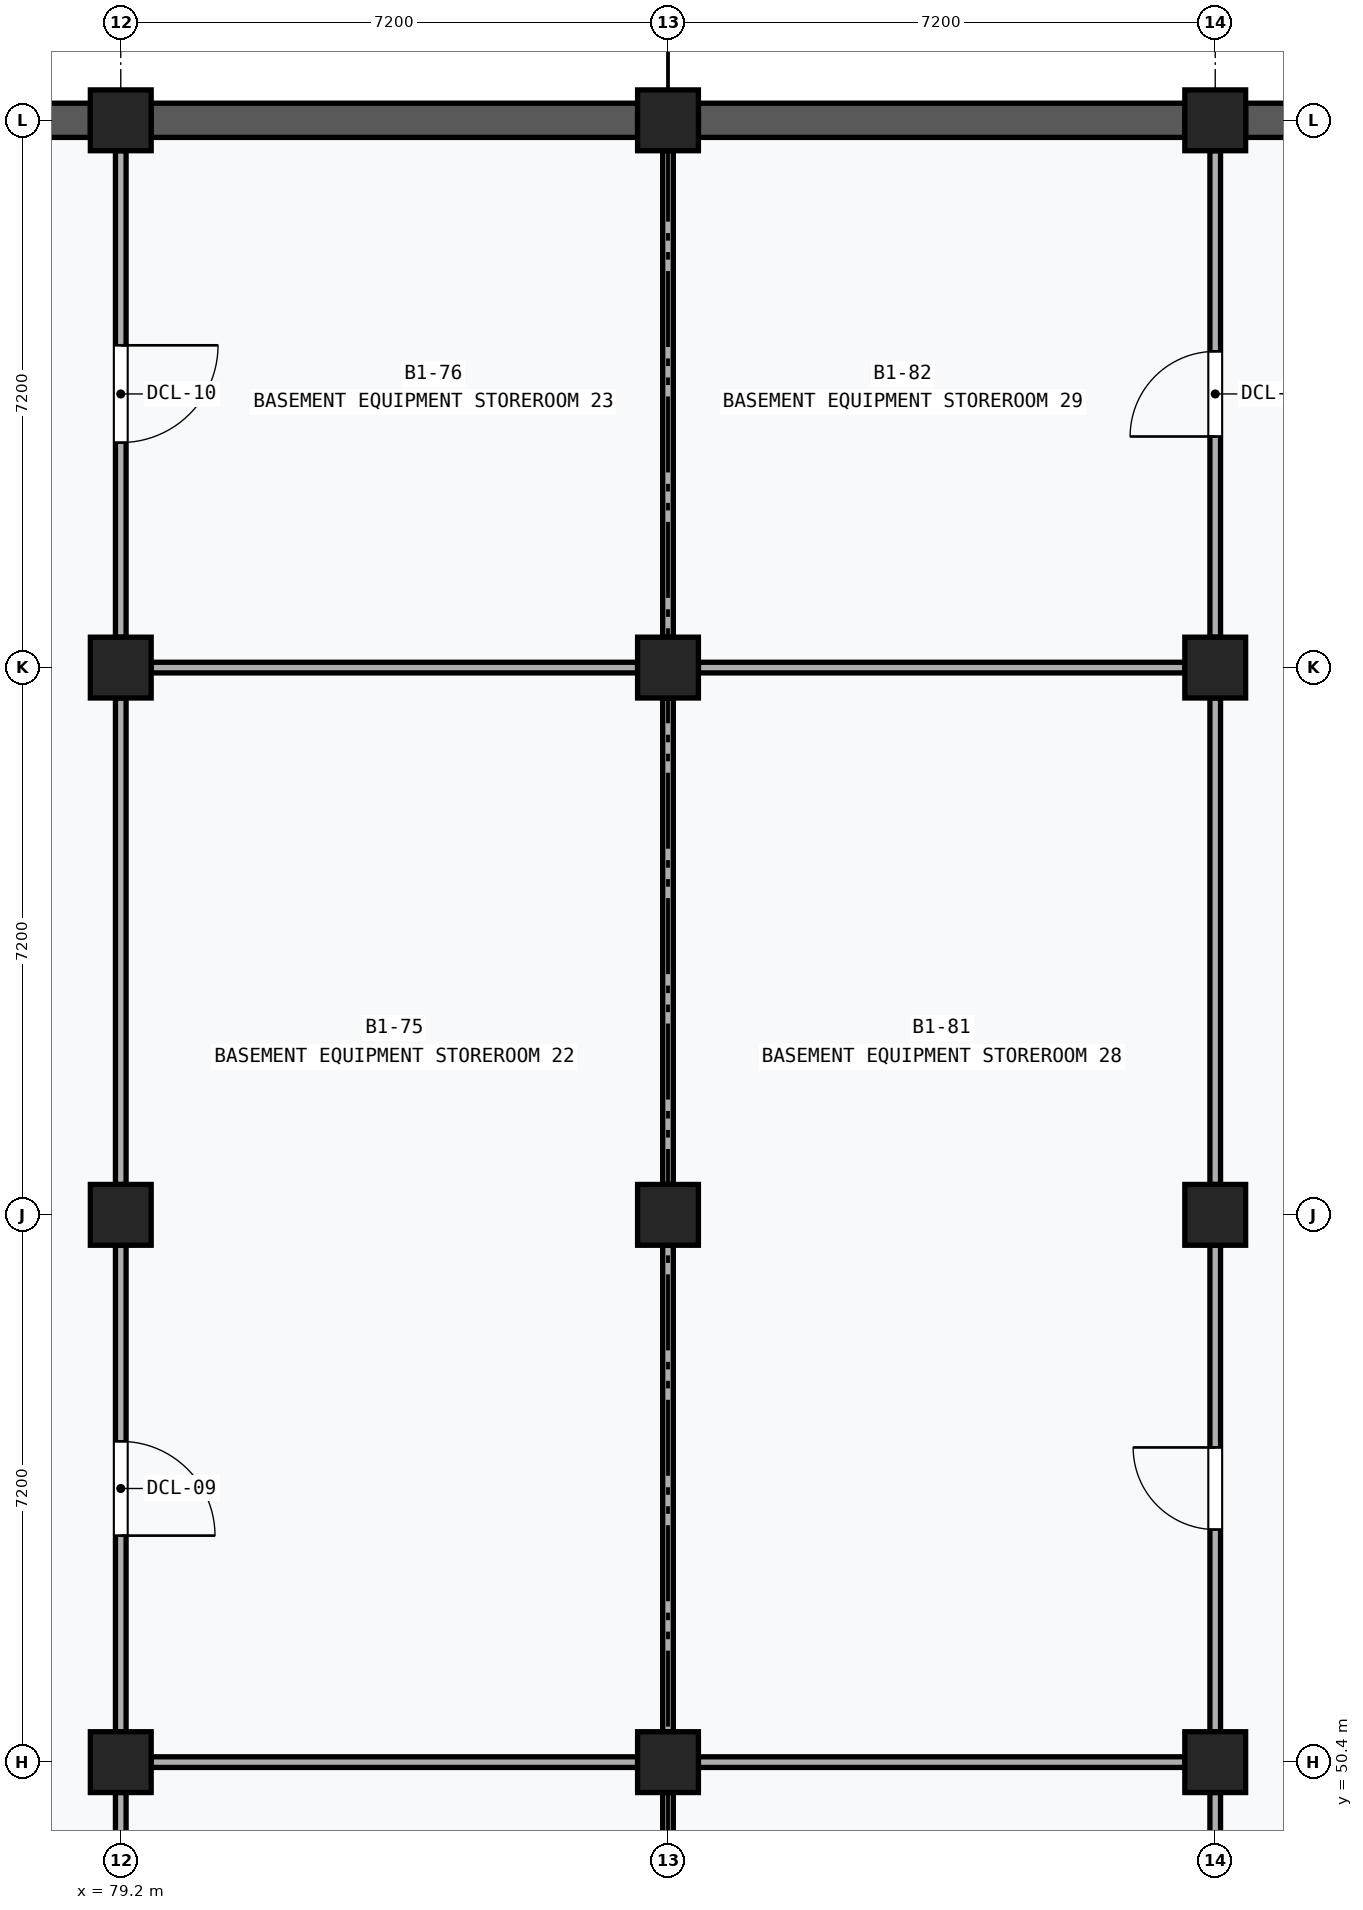
"""IFC4 building model, lengths in metres.
Left out: names, types, materials, properties, quantities, classifications, styles, units other than length and angle.
Written with IfcOpenShell. Run it as: python <this file> out.ifc"""

import sys

from ifc_helpers import new_model, si_unit, direction, frame, frame_2d, origin, origin_2d, place, context, subcontext, project, spatial, rectangle, extrude, element, fill, save


model = new_model("IFC4")
c1 = context("Model", 3, precision=1e-05, world=origin(), true_north=direction((0.0, 1.0)))
c2 = subcontext(c1, "Body", "Model", "MODEL_VIEW")
j1 = project(units=[si_unit("LENGTHUNIT", "METRE"), si_unit("PLANEANGLEUNIT", "RADIAN")], contexts=[c1])
p1 = place(None, origin())
s1 = spatial("IfcSite", under=j1, at=p1, CompositionType="ELEMENT")
p2 = place(p1, origin())
s2 = spatial("IfcBuilding", under=s1, at=p2, CompositionType="ELEMENT")
p3 = place(p2, frame((0.0, 0.0, -4.5)))
s3 = spatial("IfcBuildingStorey", under=s2, at=p3, CompositionType="ELEMENT", Elevation=-4.5)
for number, where, z_axis, x_axis in (
    (1, (79.2, 50.4, 0.0), (0.0, 0.0, 1.0), (1.0, 0.0, 0.0)),
    (2, (79.2, 57.6, 0.0), (0.0, 0.0, 1.0), (1.0, 0.0, 0.0)),
    (3, (79.2, 64.8, 0.0), (0.0, 0.0, 1.0), (1.0, 0.0, 0.0)),
    (4, (79.2, 72.0, 0.0), (0.0, 0.0, 1.0), (1.0, 0.0, 0.0)),
    (5, (86.4, 50.4, 0.0), (0.0, 0.0, 1.0), (1.0, 0.0, 0.0)),
    (6, (86.4, 57.6, 0.0), (0.0, 0.0, 1.0), (1.0, 0.0, 0.0)),
    (7, (86.4, 64.8, 0.0), (0.0, 0.0, 1.0), (1.0, 0.0, 0.0)),
    (8, (86.4, 72.0, 0.0), (0.0, 0.0, 1.0), (1.0, 0.0, 0.0)),
    (9, (93.6, 50.4, 0.0), (0.0, 0.0, 1.0), (1.0, 0.0, 0.0)),
    (10, (93.6, 57.6, 0.0), (0.0, 0.0, 1.0), (1.0, 0.0, 0.0)),
    (11, (93.6, 64.8, 0.0), (0.0, 0.0, 1.0), (1.0, 0.0, 0.0)),
    (12, (93.6, 72.0, 0.0), (0.0, 0.0, 1.0), (1.0, 0.0, 0.0)),
):
    element("IfcColumn", number, at=place(p3, frame(where, z_axis=z_axis, x_axis=x_axis)), inside=s3, PredefinedType="COLUMN", context=c2, shape_type="SweptSolid", body=[
        extrude(rectangle(XDim=0.8, YDim=0.8, at=origin_2d()), origin(), (0.0, 0.0, 1.0), 4.5),
    ])
p4 = place(p3, frame((72.4, 72.0, 0.0), z_axis=(0.0, 0.0, 1.0), x_axis=(1.0, 0.0, 0.0)))
e13 = element("IfcWall", 13, at=p4, inside=s3, PredefinedType="SOLIDWALL", context=c2, shape_type="SweptSolid", body=[
    extrude(rectangle(XDim=6.4, YDim=0.45, at=frame_2d((3.2, 0.0))), origin(), (0.0, 0.0, 1.0), 3.57),
])
for number, where, z_axis, x_axis in (
    (14, (79.6, 72.0, 0.0), (0.0, 0.0, 1.0), (1.0, 0.0, 0.0)),
    (15, (86.8, 72.0, 0.0), (0.0, 0.0, 1.0), (1.0, 0.0, 0.0)),
):
    element("IfcWall", number, at=place(p3, frame(where, z_axis=z_axis, x_axis=x_axis)), inside=s3, PredefinedType="SOLIDWALL", context=c2, shape_type="SweptSolid", body=[
        extrude(rectangle(XDim=6.4, YDim=0.45, at=frame_2d((3.2, 0.0))), origin(), (0.0, 0.0, 1.0), 3.57),
    ])
p5 = place(p3, frame((94.0, 72.0, 0.0), z_axis=(0.0, 0.0, 1.0), x_axis=(1.0, 0.0, 0.0)))
e16 = element("IfcWall", 16, at=p5, inside=s3, PredefinedType="SOLIDWALL", context=c2, shape_type="SweptSolid", body=[
    extrude(rectangle(XDim=6.35, YDim=0.45, at=frame_2d((3.175, 0.0))), origin(), (0.0, 0.0, 1.0), 3.57),
])
for number, where, z_axis, x_axis in (
    (17, (79.6, 50.4, 0.0), (0.0, 0.0, 1.0), (1.0, 0.0, 0.0)),
    (18, (79.2, 43.6, 0.0), (0.0, 0.0, 1.0), (0.0, 1.0, 0.0)),
    (19, (86.4, 43.6, 0.0), (0.0, 0.0, 1.0), (0.0, 1.0, 0.0)),
):
    element("IfcWall", number, at=place(p3, frame(where, z_axis=z_axis, x_axis=x_axis)), inside=s3, PredefinedType="PARTITIONING", context=c2, shape_type="SweptSolid", body=[
        extrude(rectangle(XDim=6.4, YDim=0.14, at=frame_2d((3.2, 0.0))), origin(), (0.0, 0.0, 1.0), 3.3),
    ])
p6 = place(p3, frame((79.2, 50.8, 0.0), z_axis=(0.0, 0.0, 1.0), x_axis=(0.0, 1.0, 0.0)))
e20 = element("IfcWall", 20, at=p6, inside=s3, PredefinedType="PARTITIONING", context=c2, shape_type="SweptSolid", body=[
    extrude(rectangle(XDim=6.4, YDim=0.14, at=frame_2d((3.2, 0.0))), origin(), (0.0, 0.0, 1.0), 3.3),
])
p7 = place(p6, frame((2.58, 0.0, 0.0)))
e21 = element("IfcOpeningElement", 21, at=p7, cuts=e20, PredefinedType="OPENING", context=c2, shape_type="SweptSolid", body=[
    extrude(rectangle(XDim=1.24, YDim=2.26, at=frame_2d((0.62, 1.13))), frame((0.0, 0.082, 0.0), z_axis=(0.0, -1.0, 0.0), x_axis=(1.0, 0.0, 0.0)), (0.0, 0.0, 1.0), 0.164),
])
for number, where, z_axis, x_axis in (
    (22, (86.4, 50.8, 0.0), (0.0, 0.0, 1.0), (0.0, 1.0, 0.0)),
    (23, (79.6, 64.8, 0.0), (0.0, 0.0, 1.0), (1.0, 0.0, 0.0)),
    (24, (79.2, 58.0, 0.0), (0.0, 0.0, 1.0), (0.0, 1.0, 0.0)),
    (25, (86.4, 58.0, 0.0), (0.0, 0.0, 1.0), (0.0, 1.0, 0.0)),
):
    element("IfcWall", number, at=place(p3, frame(where, z_axis=z_axis, x_axis=x_axis)), inside=s3, PredefinedType="PARTITIONING", context=c2, shape_type="SweptSolid", body=[
        extrude(rectangle(XDim=6.4, YDim=0.14, at=frame_2d((3.2, 0.0))), origin(), (0.0, 0.0, 1.0), 3.3),
    ])
p8 = place(p3, frame((79.2, 65.2, 0.0), z_axis=(0.0, 0.0, 1.0), x_axis=(0.0, 1.0, 0.0)))
e26 = element("IfcWall", 26, at=p8, inside=s3, PredefinedType="PARTITIONING", context=c2, shape_type="SweptSolid", body=[
    extrude(rectangle(XDim=6.4, YDim=0.14, at=frame_2d((3.2, 0.0))), origin(), (0.0, 0.0, 1.0), 3.3),
])
p9 = place(p8, frame((2.56, 0.0, 0.0)))
e27 = element("IfcOpeningElement", 27, at=p9, cuts=e26, PredefinedType="OPENING", context=c2, shape_type="SweptSolid", body=[
    extrude(rectangle(XDim=1.28, YDim=2.28, at=frame_2d((0.64, 1.14))), frame((0.0, 0.082, 0.0), z_axis=(0.0, -1.0, 0.0), x_axis=(1.0, 0.0, 0.0)), (0.0, 0.0, 1.0), 0.164),
])
p10 = place(p3, frame((86.4, 65.2, 0.0), z_axis=(0.0, 0.0, 1.0), x_axis=(0.0, 1.0, 0.0)))
e28 = element("IfcWall", 28, at=p10, inside=s3, PredefinedType="PARTITIONING", context=c2, shape_type="SweptSolid", body=[
    extrude(rectangle(XDim=6.4, YDim=0.14, at=frame_2d((3.2, 0.0))), origin(), (0.0, 0.0, 1.0), 3.3),
])
for number, where, z_axis, x_axis in (
    (29, (86.8, 50.4, 0.0), (0.0, 0.0, 1.0), (1.0, 0.0, 0.0)),
    (30, (93.6, 43.6, 0.0), (0.0, 0.0, 1.0), (0.0, 1.0, 0.0)),
):
    element("IfcWall", number, at=place(p3, frame(where, z_axis=z_axis, x_axis=x_axis)), inside=s3, PredefinedType="PARTITIONING", context=c2, shape_type="SweptSolid", body=[
        extrude(rectangle(XDim=6.4, YDim=0.14, at=frame_2d((3.2, 0.0))), origin(), (0.0, 0.0, 1.0), 3.3),
    ])
p11 = place(p3, frame((93.6, 50.8, 0.0), z_axis=(0.0, 0.0, 1.0), x_axis=(0.0, 1.0, 0.0)))
e31 = element("IfcWall", 31, at=p11, inside=s3, PredefinedType="PARTITIONING", context=c2, shape_type="SweptSolid", body=[
    extrude(rectangle(XDim=6.4, YDim=0.14, at=frame_2d((3.2, 0.0))), origin(), (0.0, 0.0, 1.0), 3.3),
])
p12 = place(p11, frame((2.66, 0.0, 0.0)))
e32 = element("IfcOpeningElement", 32, at=p12, cuts=e31, PredefinedType="OPENING", context=c2, shape_type="SweptSolid", body=[
    extrude(rectangle(XDim=1.08, YDim=2.18, at=frame_2d((0.54, 1.09))), frame((0.0, 0.082, 0.0), z_axis=(0.0, -1.0, 0.0), x_axis=(1.0, 0.0, 0.0)), (0.0, 0.0, 1.0), 0.164),
])
for number, where, z_axis, x_axis in (
    (33, (86.8, 64.8, 0.0), (0.0, 0.0, 1.0), (1.0, 0.0, 0.0)),
    (34, (93.6, 58.0, 0.0), (0.0, 0.0, 1.0), (0.0, 1.0, 0.0)),
):
    element("IfcWall", number, at=place(p3, frame(where, z_axis=z_axis, x_axis=x_axis)), inside=s3, PredefinedType="PARTITIONING", context=c2, shape_type="SweptSolid", body=[
        extrude(rectangle(XDim=6.4, YDim=0.14, at=frame_2d((3.2, 0.0))), origin(), (0.0, 0.0, 1.0), 3.3),
    ])
p13 = place(p3, frame((93.6, 65.2, 0.0), z_axis=(0.0, 0.0, 1.0), x_axis=(0.0, 1.0, 0.0)))
e35 = element("IfcWall", 35, at=p13, inside=s3, PredefinedType="PARTITIONING", context=c2, shape_type="SweptSolid", body=[
    extrude(rectangle(XDim=6.4, YDim=0.14, at=frame_2d((3.2, 0.0))), origin(), (0.0, 0.0, 1.0), 3.3),
])
p14 = place(p13, frame((2.64, 0.0, 0.0)))
e36 = element("IfcOpeningElement", 36, at=p14, cuts=e35, PredefinedType="OPENING", context=c2, shape_type="SweptSolid", body=[
    extrude(rectangle(XDim=1.12, YDim=2.2, at=frame_2d((0.56, 1.1))), frame((0.0, 0.082, 0.0), z_axis=(0.0, -1.0, 0.0), x_axis=(1.0, 0.0, 0.0)), (0.0, 0.0, 1.0), 0.164),
])
p15 = place(p7, frame((1.24, 0.0, 0.0), z_axis=(0.0, 0.0, 1.0), x_axis=(-1.0, 0.0, 0.0)))
e37 = element("IfcDoor", 37, at=p15, inside=s3, OperationType="SINGLE_SWING_RIGHT", PredefinedType="DOOR", context=c2, shape_type="SweptSolid", body=[
    extrude(rectangle(XDim=1.24, YDim=2.26, at=frame_2d((0.62, 1.13))), frame((0.0, 0.025, 0.0), z_axis=(0.0, -1.0, 0.0), x_axis=(1.0, 0.0, 0.0)), (0.0, 0.0, 1.0), 0.05),
])
fill(e21, e37)
p16 = place(p9, frame((1.28, 0.0, 0.0), z_axis=(0.0, 0.0, 1.0), x_axis=(-1.0, 0.0, 0.0)))
e38 = element("IfcDoor", 38, at=p16, inside=s3, OperationType="SINGLE_SWING_LEFT", PredefinedType="DOOR", context=c2, shape_type="SweptSolid", body=[
    extrude(rectangle(XDim=1.28, YDim=2.28, at=frame_2d((0.64, 1.14))), frame((0.0, 0.025, 0.0), z_axis=(0.0, -1.0, 0.0), x_axis=(1.0, 0.0, 0.0)), (0.0, 0.0, 1.0), 0.05),
])
fill(e27, e38)
p17 = place(p12, origin())
e39 = element("IfcDoor", 39, at=p17, inside=s3, OperationType="SINGLE_SWING_RIGHT", PredefinedType="DOOR", context=c2, shape_type="SweptSolid", body=[
    extrude(rectangle(XDim=1.08, YDim=2.18, at=frame_2d((0.54, 1.09))), frame((0.0, 0.025, 0.0), z_axis=(0.0, -1.0, 0.0), x_axis=(1.0, 0.0, 0.0)), (0.0, 0.0, 1.0), 0.05),
])
fill(e32, e39)
p18 = place(p14, origin())
e40 = element("IfcDoor", 40, at=p18, inside=s3, OperationType="SINGLE_SWING_LEFT", PredefinedType="DOOR", context=c2, shape_type="SweptSolid", body=[
    extrude(rectangle(XDim=1.12, YDim=2.2, at=frame_2d((0.56, 1.1))), frame((0.0, 0.025, 0.0), z_axis=(0.0, -1.0, 0.0), x_axis=(1.0, 0.0, 0.0)), (0.0, 0.0, 1.0), 0.05),
])
fill(e36, e40)
save(model, sys.argv[1])
